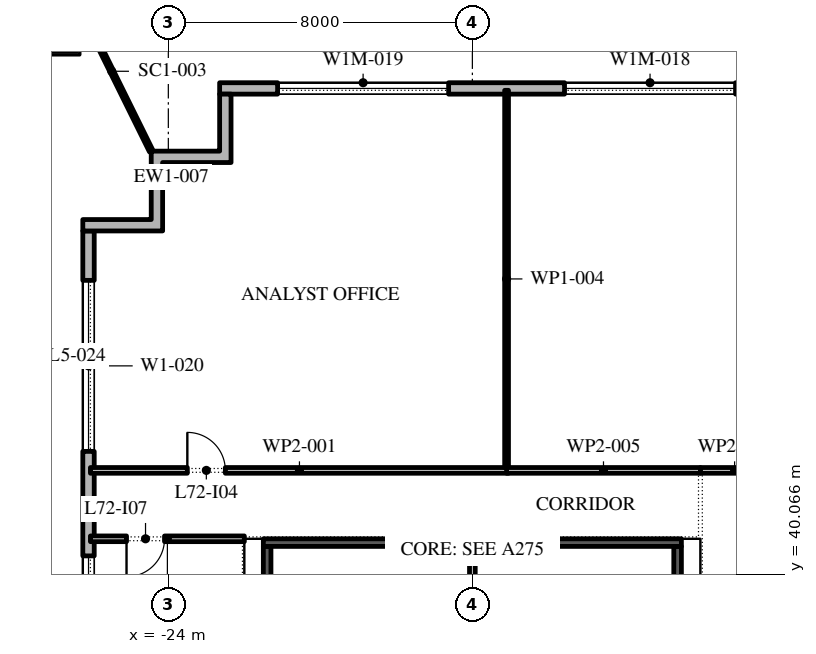
"""IFC4 building model, lengths in metres.
Left out: names, types, materials, properties, quantities, classifications, styles, units other than length and angle.
Written with IfcOpenShell. Run it as: python <this file> out.ifc"""

import sys

from ifc_helpers import new_model, si_unit, direction, frame, frame_2d, origin, place, context, subcontext, project, spatial, polyline, rectangle, outline, extrude, element, fill, save


model = new_model("IFC4")
c1 = context("Model", 3, precision=1e-05, world=origin(), true_north=direction((0.0, 1.0)))
c2 = subcontext(c1, "Body", "Model", "MODEL_VIEW")
j1 = project(units=[si_unit("LENGTHUNIT", "METRE"), si_unit("PLANEANGLEUNIT", "RADIAN")], contexts=[c1])
p1 = place(None, origin())
s1 = spatial("IfcSite", under=j1, at=p1, CompositionType="ELEMENT")
p2 = place(p1, origin())
s2 = spatial("IfcBuilding", under=s1, at=p2, CompositionType="ELEMENT")
p3 = place(p2, frame((0.0, 0.0, 330.0)))
s3 = spatial("IfcBuildingStorey", under=s2, at=p3, CompositionType="ELEMENT", Elevation=330.0)
p4 = place(p3, frame((22.35, 52.85, 0.0), z_axis=(0.0, 0.0, 1.0), x_axis=(-1.0, 0.0, 0.0)))
e1 = element("IfcWall", 1, at=p4, inside=s3, PredefinedType="STANDARD", context=c2, shape_type="SweptSolid", body=[
    extrude(rectangle(XDim=45.0, YDim=0.3, at=frame_2d((22.5, 0.0))), origin(), (0.0, 0.0, 1.0), 4.0),
])
p5 = place(p4, frame((1.375, 0.0, 0.45)))
e2 = element("IfcOpeningElement", 2, at=p5, cuts=e1, PredefinedType="OPENING", context=c2, shape_type="SweptSolid", body=[
    extrude(rectangle(XDim=4.5, YDim=2.575, at=frame_2d((2.25, 1.288))), frame((0.0, 0.16, 0.0), z_axis=(0.0, -1.0, 0.0), x_axis=(1.0, 0.0, 0.0)), (0.0, 0.0, 1.0), 0.32),
])
p6 = place(p4, frame((8.775, 0.0, 0.45)))
e3 = element("IfcOpeningElement", 3, at=p6, cuts=e1, PredefinedType="OPENING", context=c2, shape_type="SweptSolid", body=[
    extrude(rectangle(XDim=4.5, YDim=2.575, at=frame_2d((2.25, 1.288))), frame((0.0, 0.16, 0.0), z_axis=(0.0, -1.0, 0.0), x_axis=(1.0, 0.0, 0.0)), (0.0, 0.0, 1.0), 0.32),
])
p7 = place(p4, frame((17.375, 0.0, 0.0)))
e4 = element("IfcOpeningElement", 4, at=p7, cuts=e1, PredefinedType="OPENING", context=c2, shape_type="SweptSolid", body=[
    extrude(rectangle(XDim=2.4, YDim=3.025, at=frame_2d((1.2, 1.512))), frame((0.0, 0.16, 0.0), z_axis=(0.0, -1.0, 0.0), x_axis=(1.0, 0.0, 0.0)), (0.0, 0.0, 1.0), 0.32),
])
p8 = place(p4, frame((23.875, 0.0, 0.45)))
e5 = element("IfcOpeningElement", 5, at=p8, cuts=e1, PredefinedType="OPENING", context=c2, shape_type="SweptSolid", body=[
    extrude(rectangle(XDim=4.5, YDim=2.575, at=frame_2d((2.25, 1.288))), frame((0.0, 0.16, 0.0), z_axis=(0.0, -1.0, 0.0), x_axis=(1.0, 0.0, 0.0)), (0.0, 0.0, 1.0), 0.32),
])
p9 = place(p4, frame((31.425, 0.0, 0.45)))
e6 = element("IfcOpeningElement", 6, at=p9, cuts=e1, PredefinedType="OPENING", context=c2, shape_type="SweptSolid", body=[
    extrude(rectangle(XDim=4.5, YDim=2.575, at=frame_2d((2.25, 1.288))), frame((0.0, 0.16, 0.0), z_axis=(0.0, -1.0, 0.0), x_axis=(1.0, 0.0, 0.0)), (0.0, 0.0, 1.0), 0.32),
])
p10 = place(p4, frame((38.975, 0.0, 0.45)))
e7 = element("IfcOpeningElement", 7, at=p10, cuts=e1, PredefinedType="OPENING", context=c2, shape_type="SweptSolid", body=[
    extrude(rectangle(XDim=4.5, YDim=2.575, at=frame_2d((2.25, 1.288))), frame((0.0, 0.16, 0.0), z_axis=(0.0, -1.0, 0.0), x_axis=(1.0, 0.0, 0.0)), (0.0, 0.0, 1.0), 0.32),
])
p11 = place(p3, frame((-26.1, 49.1, 0.0), z_axis=(0.0, 0.0, 1.0), x_axis=(0.0, -1.0, 0.0)))
e8 = element("IfcWall", 8, at=p11, inside=s3, PredefinedType="STANDARD", context=c2, shape_type="SweptSolid", body=[
    extrude(rectangle(XDim=51.5, YDim=0.3, at=frame_2d((25.75, 0.0))), origin(), (0.0, 0.0, 1.0), 4.0),
])
p12 = place(p11, frame((1.3, 0.0, 0.45)))
e9 = element("IfcOpeningElement", 9, at=p12, cuts=e8, PredefinedType="OPENING", context=c2, shape_type="SweptSolid", body=[
    extrude(rectangle(XDim=4.5, YDim=3.05, at=frame_2d((2.25, 1.525))), frame((0.0, 0.16, 0.0), z_axis=(0.0, -1.0, 0.0), x_axis=(1.0, 0.0, 0.0)), (0.0, 0.0, 1.0), 0.32),
])
p13 = place(p11, frame((8.55, 0.0, 0.45)))
e10 = element("IfcOpeningElement", 10, at=p13, cuts=e8, PredefinedType="OPENING", context=c2, shape_type="SweptSolid", body=[
    extrude(rectangle(XDim=4.5, YDim=3.05, at=frame_2d((2.25, 1.525))), frame((0.0, 0.16, 0.0), z_axis=(0.0, -1.0, 0.0), x_axis=(1.0, 0.0, 0.0)), (0.0, 0.0, 1.0), 0.32),
])
p14 = place(p11, frame((17.0, 0.0, 0.0)))
e11 = element("IfcOpeningElement", 11, at=p14, cuts=e8, PredefinedType="OPENING", context=c2, shape_type="SweptSolid", body=[
    extrude(rectangle(XDim=2.4, YDim=3.5, at=frame_2d((1.2, 1.75))), frame((0.0, 0.16, 0.0), z_axis=(0.0, -1.0, 0.0), x_axis=(1.0, 0.0, 0.0)), (0.0, 0.0, 1.0), 0.32),
])
p15 = place(p11, frame((23.35, 0.0, 0.45)))
e12 = element("IfcOpeningElement", 12, at=p15, cuts=e8, PredefinedType="OPENING", context=c2, shape_type="SweptSolid", body=[
    extrude(rectangle(XDim=4.5, YDim=3.05, at=frame_2d((2.25, 1.525))), frame((0.0, 0.16, 0.0), z_axis=(0.0, -1.0, 0.0), x_axis=(1.0, 0.0, 0.0)), (0.0, 0.0, 1.0), 0.32),
])
p16 = place(p11, frame((30.75, 0.0, 0.45)))
e13 = element("IfcOpeningElement", 13, at=p16, cuts=e8, PredefinedType="OPENING", context=c2, shape_type="SweptSolid", body=[
    extrude(rectangle(XDim=4.5, YDim=3.05, at=frame_2d((2.25, 1.525))), frame((0.0, 0.16, 0.0), z_axis=(0.0, -1.0, 0.0), x_axis=(1.0, 0.0, 0.0)), (0.0, 0.0, 1.0), 0.32),
])
p17 = place(p11, frame((38.15, 0.0, 0.45)))
e14 = element("IfcOpeningElement", 14, at=p17, cuts=e8, PredefinedType="OPENING", context=c2, shape_type="SweptSolid", body=[
    extrude(rectangle(XDim=4.5, YDim=3.05, at=frame_2d((2.25, 1.525))), frame((0.0, 0.16, 0.0), z_axis=(0.0, -1.0, 0.0), x_axis=(1.0, 0.0, 0.0)), (0.0, 0.0, 1.0), 0.32),
])
p18 = place(p11, frame((46.6, 0.0, 0.0)))
e15 = element("IfcOpeningElement", 15, at=p18, cuts=e8, PredefinedType="OPENING", context=c2, shape_type="SweptSolid", body=[
    extrude(rectangle(XDim=2.4, YDim=3.5, at=frame_2d((1.2, 1.75))), frame((0.0, 0.16, 0.0), z_axis=(0.0, -1.0, 0.0), x_axis=(1.0, 0.0, 0.0)), (0.0, 0.0, 1.0), 0.32),
])
p19 = place(p3, origin())
e16 = element("IfcWall", 16, at=p19, inside=s3, PredefinedType="STANDARD", context=c2, shape_type="SweptSolid", body=[
    extrude(outline(polyline([(-24.45, 49.4), (-24.45, 51.2), (-22.65, 51.2), (-22.65, 52.7), (-22.35, 52.7), (-22.35, 50.9), (-24.15, 50.9), (-24.15, 49.1), (-26.25, 49.1), (-26.25, 49.4), (-24.45, 49.4)])), origin(), (0.0, 0.0, 1.0), 4.0),
])
p20 = place(p3, frame((-24.45, 51.2, -0.05), z_axis=(0.0, 0.0, 1.0), x_axis=(-0.443209769794, 0.896417927063, 0.0)))
e17 = element("IfcWall", 17, at=p20, inside=s3, PredefinedType="STANDARD", context=c2, shape_type="SweptSolid", body=[
    extrude(rectangle(XDim=4.688, YDim=0.1, at=frame_2d((2.344, 0.0))), origin(), (0.0, 0.0, 1.0), 4.05),
])
p21 = place(p3, frame((-21.4, 25.75, 0.0), z_axis=(0.0, 0.0, 1.0), x_axis=(0.0, 1.0, 0.0)))
e18 = element("IfcWall", 18, at=p21, inside=s3, PredefinedType="SHEAR", context=c2, shape_type="SweptSolid", body=[
    extrude(rectangle(XDim=15.05, YDim=0.2, at=frame_2d((7.525, 0.0))), origin(), (0.0, 0.0, 1.0), 4.0),
])
p22 = place(p21, frame((7.075, 0.0, 0.0)))
e19 = element("IfcOpeningElement", 19, at=p22, cuts=e18, PredefinedType="OPENING", context=c2, shape_type="SweptSolid", body=[
    extrude(rectangle(XDim=0.9, YDim=2.1, at=frame_2d((0.45, 1.05))), frame((0.0, 0.11, 0.0), z_axis=(0.0, -1.0, 0.0), x_axis=(1.0, 0.0, 0.0)), (0.0, 0.0, 1.0), 0.22),
])
p23 = place(p3, frame((-10.6, 25.75, 0.0), z_axis=(0.0, 0.0, 1.0), x_axis=(0.0, 1.0, 0.0)))
e20 = element("IfcWall", 20, at=p23, inside=s3, PredefinedType="SHEAR", context=c2, shape_type="SweptSolid", body=[
    extrude(rectangle(XDim=15.05, YDim=0.2, at=frame_2d((7.525, 0.0))), origin(), (0.0, 0.0, 1.0), 4.0),
])
p24 = place(p23, frame((3.288, 0.0, 0.0)))
e21 = element("IfcOpeningElement", 21, at=p24, cuts=e20, PredefinedType="OPENING", context=c2, shape_type="SweptSolid", body=[
    extrude(rectangle(XDim=0.9, YDim=2.1, at=frame_2d((0.45, 1.05))), frame((0.0, 0.11, 0.0), z_axis=(0.0, -1.0, 0.0), x_axis=(1.0, 0.0, 0.0)), (0.0, 0.0, 1.0), 0.22),
])
p25 = place(p23, frame((10.887, 0.0, 0.0)))
e22 = element("IfcOpeningElement", 22, at=p25, cuts=e20, PredefinedType="OPENING", context=c2, shape_type="SweptSolid", body=[
    extrude(rectangle(XDim=0.9, YDim=2.1, at=frame_2d((0.45, 1.05))), frame((0.0, 0.11, 0.0), z_axis=(0.0, -1.0, 0.0), x_axis=(1.0, 0.0, 0.0)), (0.0, 0.0, 1.0), 0.22),
])
p26 = place(p3, frame((-21.5, 40.9, 0.0), z_axis=(0.0, 0.0, 1.0), x_axis=(1.0, 0.0, 0.0)))
e23 = element("IfcWall", 23, at=p26, inside=s3, PredefinedType="SHEAR", context=c2, shape_type="SweptSolid", body=[
    extrude(rectangle(XDim=11.0, YDim=0.2, at=frame_2d((5.5, 0.0))), origin(), (0.0, 0.0, 1.0), 4.0),
])
p27 = place(p3, frame((-16.0, 25.75, 0.0), z_axis=(0.0, 0.0, 1.0), x_axis=(0.0, 1.0, 0.0)))
e24 = element("IfcWall", 24, at=p27, inside=s3, PredefinedType="PARTITIONING", context=c2, shape_type="SweptSolid", body=[
    extrude(rectangle(XDim=15.05, YDim=0.15, at=frame_2d((7.525, 0.0))), origin(), (0.0, 0.0, 1.0), 4.0),
])
p28 = place(p3, frame((-26.05, 42.8, 0.0), z_axis=(0.0, 0.0, 1.0), x_axis=(1.0, 0.0, 0.0)))
e25 = element("IfcWall", 25, at=p28, inside=s3, PredefinedType="PARTITIONING", context=c2, shape_type="SweptSolid", body=[
    extrude(rectangle(XDim=11.0, YDim=0.15, at=frame_2d((5.5, 0.0))), origin(), (0.0, 0.0, 1.0), 4.0),
])
p29 = place(p28, frame((2.55, 0.0, 0.0)))
e26 = element("IfcOpeningElement", 26, at=p29, cuts=e25, PredefinedType="OPENING", context=c2, shape_type="SweptSolid", body=[
    extrude(rectangle(XDim=1.0, YDim=2.1, at=frame_2d((0.5, 1.05))), frame((0.0, 0.085, 0.0), z_axis=(0.0, -1.0, 0.0), x_axis=(1.0, 0.0, 0.0)), (0.0, 0.0, 1.0), 0.17),
])
p30 = place(p3, frame((-22.0, 41.0, 0.0), z_axis=(0.0, 0.0, 1.0), x_axis=(-1.0, 0.0, 0.0)))
e27 = element("IfcWall", 27, at=p30, inside=s3, PredefinedType="PARTITIONING", context=c2, shape_type="SweptSolid", body=[
    extrude(rectangle(XDim=4.05, YDim=0.15, at=frame_2d((2.025, 0.0))), origin(), (0.0, 0.0, 1.0), 4.0),
])
p31 = place(p30, frame((2.1, 0.0, 0.0)))
e28 = element("IfcOpeningElement", 28, at=p31, cuts=e27, PredefinedType="OPENING", context=c2, shape_type="SweptSolid", body=[
    extrude(rectangle(XDim=1.0, YDim=2.1, at=frame_2d((0.5, 1.05))), frame((0.0, 0.085, 0.0), z_axis=(0.0, -1.0, 0.0), x_axis=(1.0, 0.0, 0.0)), (0.0, 0.0, 1.0), 0.17),
])
p32 = place(p3, frame((-15.1, 42.875, 0.0), z_axis=(0.0, 0.0, 1.0), x_axis=(0.0, 1.0, 0.0)))
e29 = element("IfcWall", 29, at=p32, inside=s3, PredefinedType="PARTITIONING", context=c2, shape_type="SweptSolid", body=[
    extrude(rectangle(XDim=9.925, YDim=0.1, at=frame_2d((4.962, 0.0))), origin(), (0.0, 0.0, 1.0), 4.0),
])
p33 = place(p3, frame((-15.1, 42.8, 0.0), z_axis=(0.0, 0.0, 1.0), x_axis=(1.0, 0.0, 0.0)))
e30 = element("IfcWall", 30, at=p33, inside=s3, PredefinedType="PARTITIONING", context=c2, shape_type="SweptSolid", body=[
    extrude(rectangle(XDim=5.1, YDim=0.15, at=frame_2d((2.55, 0.0))), origin(), (0.0, 0.0, 1.0), 4.0),
])
p34 = place(p3, frame((-10.0, 42.8, 0.0), z_axis=(0.0, 0.0, 1.0), x_axis=(1.0, 0.0, 0.0)))
e31 = element("IfcWall", 31, at=p34, inside=s3, PredefinedType="PARTITIONING", context=c2, shape_type="SweptSolid", body=[
    extrude(rectangle(XDim=1.8, YDim=0.15, at=frame_2d((0.9, 0.0))), origin(), (0.0, 0.0, 1.0), 4.0),
])
p35 = place(p9, origin())
e32 = element("IfcWindow", 32, at=p35, inside=s3, PartitioningType="DOUBLE_PANEL_VERTICAL", PredefinedType="WINDOW", context=c2, shape_type="SweptSolid", body=[
    extrude(rectangle(XDim=4.5, YDim=2.575, at=frame_2d((2.25, 1.288))), frame((0.0, 0.03, 0.0), z_axis=(0.0, -1.0, 0.0), x_axis=(1.0, 0.0, 0.0)), (0.0, 0.0, 1.0), 0.06),
])
fill(e6, e32)
p36 = place(p10, origin())
e33 = element("IfcWindow", 33, at=p36, inside=s3, PartitioningType="DOUBLE_PANEL_VERTICAL", PredefinedType="WINDOW", context=c2, shape_type="SweptSolid", body=[
    extrude(rectangle(XDim=4.5, YDim=2.575, at=frame_2d((2.25, 1.288))), frame((0.0, 0.03, 0.0), z_axis=(0.0, -1.0, 0.0), x_axis=(1.0, 0.0, 0.0)), (0.0, 0.0, 1.0), 0.06),
])
fill(e7, e33)
p37 = place(p12, origin())
e34 = element("IfcWindow", 34, at=p37, inside=s3, PartitioningType="DOUBLE_PANEL_VERTICAL", PredefinedType="WINDOW", context=c2, shape_type="SweptSolid", body=[
    extrude(rectangle(XDim=4.5, YDim=3.05, at=frame_2d((2.25, 1.525))), frame((0.0, 0.03, 0.0), z_axis=(0.0, -1.0, 0.0), x_axis=(1.0, 0.0, 0.0)), (0.0, 0.0, 1.0), 0.06),
])
fill(e9, e34)
p38 = place(p13, origin())
e35 = element("IfcWindow", 35, at=p38, inside=s3, PartitioningType="DOUBLE_PANEL_VERTICAL", PredefinedType="WINDOW", context=c2, shape_type="SweptSolid", body=[
    extrude(rectangle(XDim=4.5, YDim=3.05, at=frame_2d((2.25, 1.525))), frame((0.0, 0.03, 0.0), z_axis=(0.0, -1.0, 0.0), x_axis=(1.0, 0.0, 0.0)), (0.0, 0.0, 1.0), 0.06),
])
fill(e10, e35)
p39 = place(p29, origin())
e36 = element("IfcDoor", 36, at=p39, inside=s3, OperationType="SINGLE_SWING_RIGHT", PredefinedType="DOOR", context=c2, shape_type="SweptSolid", body=[
    extrude(rectangle(XDim=1.0, YDim=2.1, at=frame_2d((0.5, 1.05))), frame((0.0, 0.025, 0.0), z_axis=(0.0, -1.0, 0.0), x_axis=(1.0, 0.0, 0.0)), (0.0, 0.0, 1.0), 0.05),
])
fill(e26, e36)
p40 = place(p31, origin())
e37 = element("IfcDoor", 37, at=p40, inside=s3, OperationType="SINGLE_SWING_LEFT", PredefinedType="DOOR", context=c2, shape_type="SweptSolid", body=[
    extrude(rectangle(XDim=1.0, YDim=2.1, at=frame_2d((0.5, 1.05))), frame((0.0, 0.025, 0.0), z_axis=(0.0, -1.0, 0.0), x_axis=(1.0, 0.0, 0.0)), (0.0, 0.0, 1.0), 0.05),
])
fill(e28, e37)
save(model, sys.argv[1])
